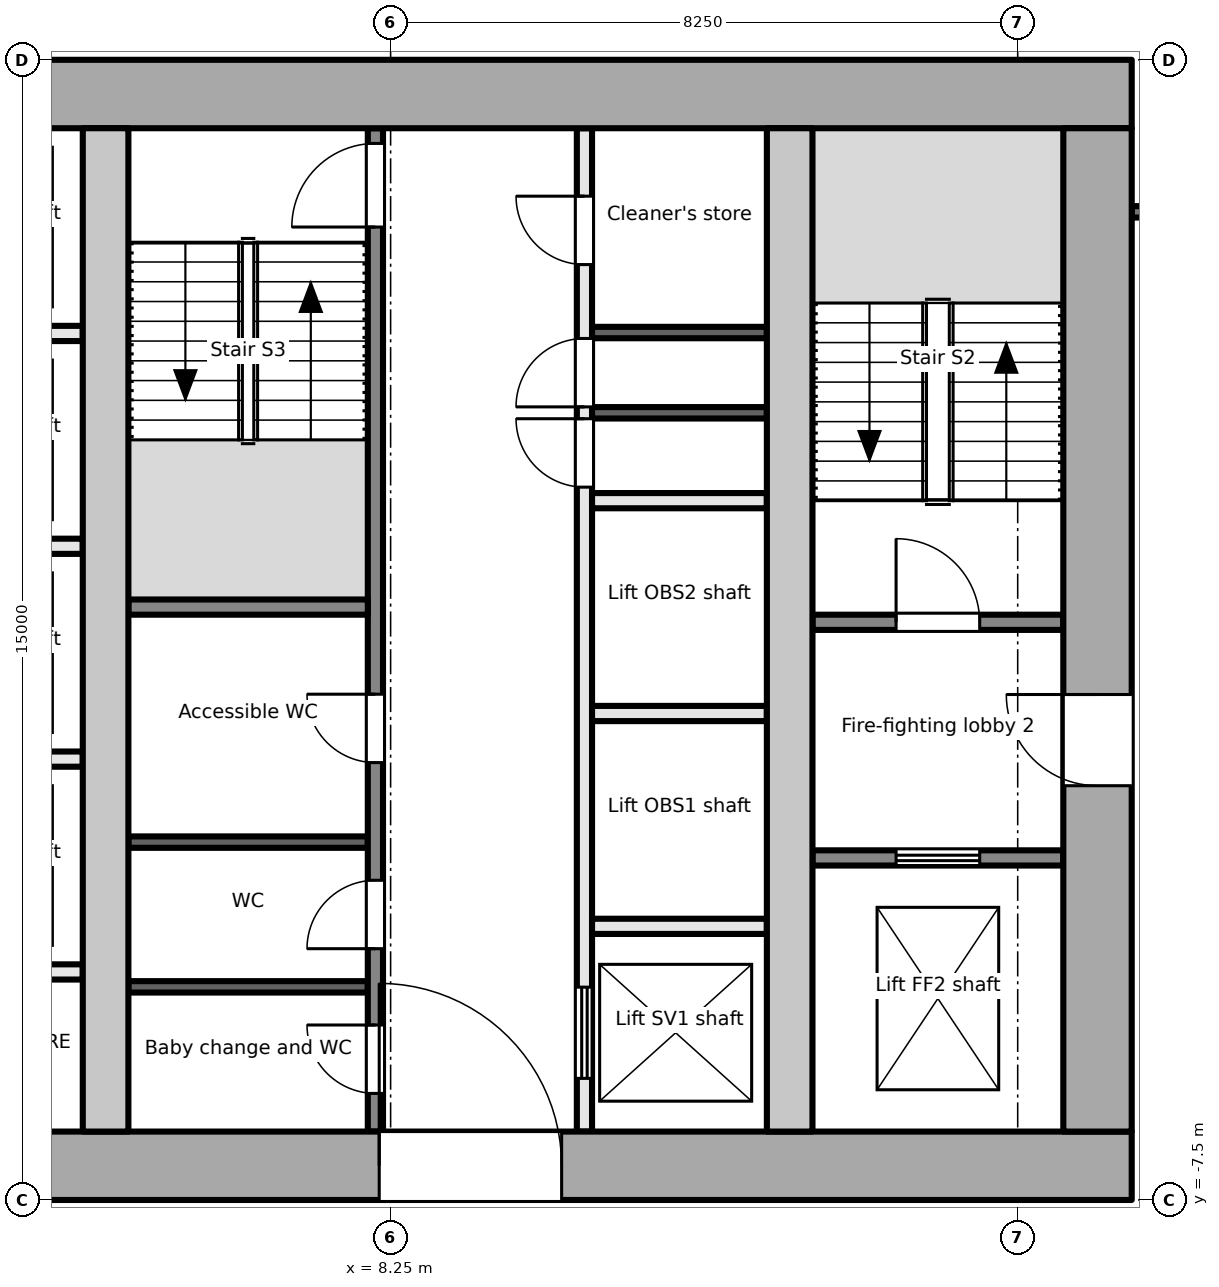
"""IFC4 building model, lengths in metres.
Left out: names, types, materials, properties, quantities, classifications, styles, units other than length and angle.
Written with IfcOpenShell. Run it as: python <this file> out.ifc"""

import sys

from ifc_helpers import new_model, si_unit, direction, frame, frame_2d, origin, place, context, subcontext, project, spatial, rectangle, extrude, element, fill, save


model = new_model("IFC4")
c1 = context("Model", 3, precision=1e-05, world=origin(), true_north=direction((0.0, 1.0)))
c2 = subcontext(c1, "Body", "Model", "MODEL_VIEW")
j1 = project(units=[si_unit("LENGTHUNIT", "METRE"), si_unit("PLANEANGLEUNIT", "RADIAN")], contexts=[c1])
p1 = place(None, origin())
s1 = spatial("IfcSite", under=j1, at=p1, CompositionType="ELEMENT")
p2 = place(p1, origin())
s2 = spatial("IfcBuilding", under=s1, at=p2, CompositionType="ELEMENT")
p3 = place(p2, frame((0.0, 0.0, 229.1)))
s3 = spatial("IfcBuildingStorey", under=s2, at=p3, CompositionType="ELEMENT", Elevation=229.1)
p4 = place(p3, frame((-18.0, -7.05, -0.2), z_axis=(0.0, 0.0, 1.0), x_axis=(1.0, 0.0, 0.0)))
e1 = element("IfcWall", 1, at=p4, inside=s3, PredefinedType="SHEAR", context=c2, shape_type="SweptSolid", body=[
    extrude(rectangle(XDim=36.0, YDim=0.9, at=frame_2d((18.0, 0.0))), origin(), (0.0, 0.0, 1.0), 3.9),
])
p5 = place(p4, frame((8.1, 0.0, 0.2)))
e2 = element("IfcOpeningElement", 2, at=p5, cuts=e1, PredefinedType="OPENING", context=c2, shape_type="SweptSolid", body=[
    extrude(rectangle(XDim=1.8, YDim=2.1, at=frame_2d((0.9, 1.05))), frame((0.0, 0.46, 0.0), z_axis=(0.0, -1.0, 0.0), x_axis=(1.0, 0.0, 0.0)), (0.0, 0.0, 1.0), 0.921),
])
p6 = place(p4, frame((16.8, 0.0, 0.2)))
e3 = element("IfcOpeningElement", 3, at=p6, cuts=e1, PredefinedType="OPENING", context=c2, shape_type="SweptSolid", body=[
    extrude(rectangle(XDim=2.4, YDim=2.1, at=frame_2d((1.2, 1.05))), frame((0.0, 0.46, 0.0), z_axis=(0.0, -1.0, 0.0), x_axis=(1.0, 0.0, 0.0)), (0.0, 0.0, 1.0), 0.921),
])
p7 = place(p4, frame((26.1, 0.0, 0.2)))
e4 = element("IfcOpeningElement", 4, at=p7, cuts=e1, PredefinedType="OPENING", context=c2, shape_type="SweptSolid", body=[
    extrude(rectangle(XDim=2.4, YDim=2.1, at=frame_2d((1.2, 1.05))), frame((0.0, 0.46, 0.0), z_axis=(0.0, -1.0, 0.0), x_axis=(1.0, 0.0, 0.0)), (0.0, 0.0, 1.0), 0.921),
])
p8 = place(p3, frame((-18.0, 7.05, -0.2), z_axis=(0.0, 0.0, 1.0), x_axis=(1.0, 0.0, 0.0)))
e5 = element("IfcWall", 5, at=p8, inside=s3, PredefinedType="SHEAR", context=c2, shape_type="SweptSolid", body=[
    extrude(rectangle(XDim=36.0, YDim=0.9, at=frame_2d((18.0, 0.0))), origin(), (0.0, 0.0, 1.0), 3.9),
])
p9 = place(p3, frame((17.55, -6.6, -0.2), z_axis=(0.0, 0.0, 1.0), x_axis=(0.0, 1.0, 0.0)))
e6 = element("IfcWall", 6, at=p9, inside=s3, PredefinedType="SHEAR", context=c2, shape_type="SweptSolid", body=[
    extrude(rectangle(XDim=13.2, YDim=0.9, at=frame_2d((6.6, 0.0))), origin(), (0.0, 0.0, 1.0), 3.9),
])
p10 = place(p9, frame((4.55, 0.0, 0.2)))
e7 = element("IfcOpeningElement", 7, at=p10, cuts=e6, PredefinedType="OPENING", context=c2, shape_type="SweptSolid", body=[
    extrude(rectangle(XDim=1.2, YDim=2.1, at=frame_2d((0.6, 1.05))), frame((0.0, 0.46, 0.0), z_axis=(0.0, -1.0, 0.0), x_axis=(1.0, 0.0, 0.0)), (0.0, 0.0, 1.0), 0.921),
])
for number, where, z_axis, x_axis in (
    (8, (4.5, -6.6, -0.2), (0.0, 0.0, 1.0), (0.0, 1.0, 0.0)),
    (9, (13.5, -6.6, -0.2), (0.0, 0.0, 1.0), (0.0, 1.0, 0.0)),
):
    element("IfcWall", number, at=place(p3, frame(where, z_axis=z_axis, x_axis=x_axis)), inside=s3, PredefinedType="SHEAR", context=c2, shape_type="SweptSolid", body=[
        extrude(rectangle(XDim=13.2, YDim=0.6, at=frame_2d((6.6, 0.0))), origin(), (0.0, 0.0, 1.0), 3.9),
    ])
p11 = place(p3, frame((13.8, -3.0, 0.0), z_axis=(0.0, 0.0, 1.0), x_axis=(1.0, 0.0, 0.0)))
e10 = element("IfcWall", 10, at=p11, inside=s3, PredefinedType="PARTITIONING", context=c2, shape_type="SweptSolid", body=[
    extrude(rectangle(XDim=3.3, YDim=0.2, at=frame_2d((1.65, 0.0))), origin(), (0.0, 0.0, 1.0), 3.7),
])
p12 = place(p11, frame((1.1, 0.0, 0.0)))
e11 = element("IfcOpeningElement", 11, at=p12, cuts=e10, PredefinedType="OPENING", context=c2, shape_type="SweptSolid", body=[
    extrude(rectangle(XDim=1.1, YDim=2.1, at=frame_2d((0.55, 1.05))), frame((0.0, 0.111, 0.0), z_axis=(0.0, -1.0, 0.0), x_axis=(1.0, 0.0, 0.0)), (0.0, 0.0, 1.0), 0.221),
])
p13 = place(p3, frame((13.8, 0.1, 0.0), z_axis=(0.0, 0.0, 1.0), x_axis=(1.0, 0.0, 0.0)))
e12 = element("IfcWall", 12, at=p13, inside=s3, PredefinedType="PARTITIONING", context=c2, shape_type="SweptSolid", body=[
    extrude(rectangle(XDim=3.3, YDim=0.2, at=frame_2d((1.65, 0.0))), origin(), (0.0, 0.0, 1.0), 3.7),
])
p14 = place(p13, frame((1.1, 0.0, 0.0)))
e13 = element("IfcOpeningElement", 13, at=p14, cuts=e12, PredefinedType="OPENING", context=c2, shape_type="SweptSolid", body=[
    extrude(rectangle(XDim=1.1, YDim=2.1, at=frame_2d((0.55, 1.05))), frame((0.0, 0.111, 0.0), z_axis=(0.0, -1.0, 0.0), x_axis=(1.0, 0.0, 0.0)), (0.0, 0.0, 1.0), 0.221),
])
for number, where, z_axis, x_axis in (
    (14, (1.9, -1.7, 0.0), (0.0, 0.0, 1.0), (1.0, 0.0, 0.0)),
    (15, (1.9, 1.1, 0.0), (0.0, 0.0, 1.0), (1.0, 0.0, 0.0)),
    (16, (1.9, 3.9, 0.0), (0.0, 0.0, 1.0), (1.0, 0.0, 0.0)),
    (17, (1.9, -4.5, 0.0), (0.0, 0.0, 1.0), (1.0, 0.0, 0.0)),
):
    element("IfcWall", number, at=place(p3, frame(where, z_axis=z_axis, x_axis=x_axis)), inside=s3, PredefinedType="PARTITIONING", context=c2, shape_type="SweptSolid", body=[
        extrude(rectangle(XDim=2.3, YDim=0.2, at=frame_2d((1.15, 0.0))), origin(), (0.0, 0.0, 1.0), 3.7),
    ])
p15 = place(p3, frame((8.05, -6.6, 0.0), z_axis=(0.0, 0.0, 1.0), x_axis=(0.0, 1.0, 0.0)))
e18 = element("IfcWall", 18, at=p15, inside=s3, PredefinedType="PARTITIONING", context=c2, shape_type="SweptSolid", body=[
    extrude(rectangle(XDim=13.2, YDim=0.2, at=frame_2d((6.6, 0.0))), origin(), (0.0, 0.0, 1.0), 3.7),
])
p16 = place(p15, frame((0.502, 0.0, 0.0)))
e19 = element("IfcOpeningElement", 19, at=p16, cuts=e18, PredefinedType="OPENING", context=c2, shape_type="SweptSolid", body=[
    extrude(rectangle(XDim=0.9, YDim=2.1, at=frame_2d((0.45, 1.05))), frame((0.0, 0.111, 0.0), z_axis=(0.0, -1.0, 0.0), x_axis=(1.0, 0.0, 0.0)), (0.0, 0.0, 1.0), 0.221),
])
p17 = place(p15, frame((2.406, 0.0, 0.0)))
e20 = element("IfcOpeningElement", 20, at=p17, cuts=e18, PredefinedType="OPENING", context=c2, shape_type="SweptSolid", body=[
    extrude(rectangle(XDim=0.9, YDim=2.1, at=frame_2d((0.45, 1.05))), frame((0.0, 0.111, 0.0), z_axis=(0.0, -1.0, 0.0), x_axis=(1.0, 0.0, 0.0)), (0.0, 0.0, 1.0), 0.221),
])
p18 = place(p15, frame((4.854, 0.0, 0.0)))
e21 = element("IfcOpeningElement", 21, at=p18, cuts=e18, PredefinedType="OPENING", context=c2, shape_type="SweptSolid", body=[
    extrude(rectangle(XDim=0.9, YDim=2.1, at=frame_2d((0.45, 1.05))), frame((0.0, 0.111, 0.0), z_axis=(0.0, -1.0, 0.0), x_axis=(1.0, 0.0, 0.0)), (0.0, 0.0, 1.0), 0.221),
])
p19 = place(p15, frame((11.9, 0.0, 0.0)))
e22 = element("IfcOpeningElement", 22, at=p19, cuts=e18, PredefinedType="OPENING", context=c2, shape_type="SweptSolid", body=[
    extrude(rectangle(XDim=1.1, YDim=2.1, at=frame_2d((0.55, 1.05))), frame((0.0, 0.111, 0.0), z_axis=(0.0, -1.0, 0.0), x_axis=(1.0, 0.0, 0.0)), (0.0, 0.0, 1.0), 0.221),
])
p20 = place(p3, frame((10.8, -6.6, 0.0), z_axis=(0.0, 0.0, 1.0), x_axis=(0.0, 1.0, 0.0)))
e23 = element("IfcWall", 23, at=p20, inside=s3, PredefinedType="PARTITIONING", context=c2, shape_type="SweptSolid", body=[
    extrude(rectangle(XDim=13.2, YDim=0.2, at=frame_2d((6.6, 0.0))), origin(), (0.0, 0.0, 1.0), 3.7),
])
p21 = place(p20, frame((0.7, 0.0, 0.0)))
e24 = element("IfcOpeningElement", 24, at=p21, cuts=e23, PredefinedType="OPENING", context=c2, shape_type="SweptSolid", body=[
    extrude(rectangle(XDim=1.2, YDim=2.1, at=frame_2d((0.6, 1.05))), frame((0.0, 0.111, 0.0), z_axis=(0.0, -1.0, 0.0), x_axis=(1.0, 0.0, 0.0)), (0.0, 0.0, 1.0), 0.221),
])
p22 = place(p20, frame((8.478, 0.0, 0.0)))
e25 = element("IfcOpeningElement", 25, at=p22, cuts=e23, PredefinedType="OPENING", context=c2, shape_type="SweptSolid", body=[
    extrude(rectangle(XDim=0.9, YDim=2.1, at=frame_2d((0.45, 1.05))), frame((0.0, 0.111, 0.0), z_axis=(0.0, -1.0, 0.0), x_axis=(1.0, 0.0, 0.0)), (0.0, 0.0, 1.0), 0.221),
])
p23 = place(p20, frame((9.534, 0.0, 0.0)))
e26 = element("IfcOpeningElement", 26, at=p23, cuts=e23, PredefinedType="OPENING", context=c2, shape_type="SweptSolid", body=[
    extrude(rectangle(XDim=0.9, YDim=2.1, at=frame_2d((0.45, 1.05))), frame((0.0, 0.111, 0.0), z_axis=(0.0, -1.0, 0.0), x_axis=(1.0, 0.0, 0.0)), (0.0, 0.0, 1.0), 0.221),
])
p24 = place(p20, frame((11.406, 0.0, 0.0)))
e27 = element("IfcOpeningElement", 27, at=p24, cuts=e23, PredefinedType="OPENING", context=c2, shape_type="SweptSolid", body=[
    extrude(rectangle(XDim=0.9, YDim=2.1, at=frame_2d((0.45, 1.05))), frame((0.0, 0.111, 0.0), z_axis=(0.0, -1.0, 0.0), x_axis=(1.0, 0.0, 0.0)), (0.0, 0.0, 1.0), 0.221),
])
p25 = place(p3, frame((4.8, 0.3, 0.0), z_axis=(0.0, 0.0, 1.0), x_axis=(1.0, 0.0, 0.0)))
e28 = element("IfcWall", 28, at=p25, inside=s3, PredefinedType="PARTITIONING", context=c2, shape_type="SweptSolid", body=[
    extrude(rectangle(XDim=3.15, YDim=0.2, at=frame_2d((1.575, 0.0))), origin(), (0.0, 0.0, 1.0), 3.7),
])
for number, where, z_axis, x_axis in (
    (29, (4.8, -4.696, 0.0), (0.0, 0.0, 1.0), (1.0, 0.0, 0.0)),
    (30, (4.8, -2.792, 0.0), (0.0, 0.0, 1.0), (1.0, 0.0, 0.0)),
):
    element("IfcWall", number, at=place(p3, frame(where, z_axis=z_axis, x_axis=x_axis)), inside=s3, PredefinedType="PARTITIONING", context=c2, shape_type="SweptSolid", body=[
        extrude(rectangle(XDim=3.15, YDim=0.15, at=frame_2d((1.575, 0.0))), origin(), (0.0, 0.0, 1.0), 3.7),
    ])
for number, where, z_axis, x_axis in (
    (31, (10.9, -3.9, 0.0), (0.0, 0.0, 1.0), (1.0, 0.0, 0.0)),
    (32, (10.9, -1.1, 0.0), (0.0, 0.0, 1.0), (1.0, 0.0, 0.0)),
    (33, (10.9, 1.7, 0.0), (0.0, 0.0, 1.0), (1.0, 0.0, 0.0)),
):
    element("IfcWall", number, at=place(p3, frame(where, z_axis=z_axis, x_axis=x_axis)), inside=s3, PredefinedType="PARTITIONING", context=c2, shape_type="SweptSolid", body=[
        extrude(rectangle(XDim=2.3, YDim=0.2, at=frame_2d((1.15, 0.0))), origin(), (0.0, 0.0, 1.0), 3.7),
    ])
for number, where, z_axis, x_axis in (
    (34, (10.9, 2.856, 0.0), (0.0, 0.0, 1.0), (1.0, 0.0, 0.0)),
    (35, (10.9, 3.912, 0.0), (0.0, 0.0, 1.0), (1.0, 0.0, 0.0)),
):
    element("IfcWall", number, at=place(p3, frame(where, z_axis=z_axis, x_axis=x_axis)), inside=s3, PredefinedType="PARTITIONING", context=c2, shape_type="SweptSolid", body=[
        extrude(rectangle(XDim=2.3, YDim=0.15, at=frame_2d((1.15, 0.0))), origin(), (0.0, 0.0, 1.0), 3.7),
    ])
p26 = place(p3, frame((18.0, 5.5, 0.0), z_axis=(0.0, 0.0, 1.0), x_axis=(1.0, 0.0, 0.0)))
e36 = element("IfcWall", 36, at=p26, inside=s3, PredefinedType="PARTITIONING", context=c2, shape_type="SweptSolid", body=[
    extrude(rectangle(XDim=2.7, YDim=0.15, at=frame_2d((1.35, 0.0))), origin(), (0.0, 0.0, 1.0), 3.7),
])
p27 = place(p26, frame((0.55, 0.0, 0.0)))
e37 = element("IfcOpeningElement", 37, at=p27, cuts=e36, PredefinedType="OPENING", context=c2, shape_type="SweptSolid", body=[
    extrude(rectangle(XDim=1.8, YDim=2.1, at=frame_2d((0.9, 1.05))), frame((0.0, 0.085, 0.0), z_axis=(0.0, -1.0, 0.0), x_axis=(1.0, 0.0, 0.0)), (0.0, 0.0, 1.0), 0.171),
])
p28 = place(p12, origin())
e38 = element("IfcDoor", 38, at=p28, inside=s3, OperationType="DOUBLE_DOOR_SLIDING", PredefinedType="DOOR", context=c2, shape_type="SweptSolid", body=[
    extrude(rectangle(XDim=1.1, YDim=2.1, at=frame_2d((0.55, 1.05))), frame((0.0, 0.025, 0.0), z_axis=(0.0, -1.0, 0.0), x_axis=(1.0, 0.0, 0.0)), (0.0, 0.0, 1.0), 0.05),
])
fill(e11, e38)
p29 = place(p10, origin())
e39 = element("IfcDoor", 39, at=p29, inside=s3, OperationType="SINGLE_SWING_RIGHT", PredefinedType="DOOR", context=c2, shape_type="SweptSolid", body=[
    extrude(rectangle(XDim=1.2, YDim=2.1, at=frame_2d((0.6, 1.05))), frame((0.0, 0.025, 0.0), z_axis=(0.0, -1.0, 0.0), x_axis=(1.0, 0.0, 0.0)), (0.0, 0.0, 1.0), 0.05),
])
fill(e7, e39)
p30 = place(p14, origin())
e40 = element("IfcDoor", 40, at=p30, inside=s3, OperationType="SINGLE_SWING_LEFT", PredefinedType="DOOR", context=c2, shape_type="SweptSolid", body=[
    extrude(rectangle(XDim=1.1, YDim=2.1, at=frame_2d((0.55, 1.05))), frame((0.0, 0.025, 0.0), z_axis=(0.0, -1.0, 0.0), x_axis=(1.0, 0.0, 0.0)), (0.0, 0.0, 1.0), 0.05),
])
fill(e13, e40)
p31 = place(p16, origin())
e41 = element("IfcDoor", 41, at=p31, inside=s3, OperationType="SINGLE_SWING_RIGHT", PredefinedType="DOOR", context=c2, shape_type="SweptSolid", body=[
    extrude(rectangle(XDim=0.9, YDim=2.1, at=frame_2d((0.45, 1.05))), frame((0.0, 0.025, 0.0), z_axis=(0.0, -1.0, 0.0), x_axis=(1.0, 0.0, 0.0)), (0.0, 0.0, 1.0), 0.05),
])
fill(e19, e41)
p32 = place(p17, origin())
e42 = element("IfcDoor", 42, at=p32, inside=s3, OperationType="SINGLE_SWING_LEFT", PredefinedType="DOOR", context=c2, shape_type="SweptSolid", body=[
    extrude(rectangle(XDim=0.9, YDim=2.1, at=frame_2d((0.45, 1.05))), frame((0.0, 0.025, 0.0), z_axis=(0.0, -1.0, 0.0), x_axis=(1.0, 0.0, 0.0)), (0.0, 0.0, 1.0), 0.05),
])
fill(e20, e42)
p33 = place(p18, origin())
e43 = element("IfcDoor", 43, at=p33, inside=s3, OperationType="SINGLE_SWING_RIGHT", PredefinedType="DOOR", context=c2, shape_type="SweptSolid", body=[
    extrude(rectangle(XDim=0.9, YDim=2.1, at=frame_2d((0.45, 1.05))), frame((0.0, 0.025, 0.0), z_axis=(0.0, -1.0, 0.0), x_axis=(1.0, 0.0, 0.0)), (0.0, 0.0, 1.0), 0.05),
])
fill(e21, e43)
p34 = place(p19, origin())
e44 = element("IfcDoor", 44, at=p34, inside=s3, OperationType="SINGLE_SWING_LEFT", PredefinedType="DOOR", context=c2, shape_type="SweptSolid", body=[
    extrude(rectangle(XDim=1.1, YDim=2.1, at=frame_2d((0.55, 1.05))), frame((0.0, 0.025, 0.0), z_axis=(0.0, -1.0, 0.0), x_axis=(1.0, 0.0, 0.0)), (0.0, 0.0, 1.0), 0.05),
])
fill(e22, e44)
p35 = place(p7, origin())
e45 = element("IfcDoor", 45, at=p35, inside=s3, OperationType="DOUBLE_DOOR_DOUBLE_SWING", PredefinedType="DOOR", context=c2, shape_type="SweptSolid", body=[
    extrude(rectangle(XDim=2.4, YDim=2.1, at=frame_2d((1.2, 1.05))), frame((0.0, 0.025, 0.0), z_axis=(0.0, -1.0, 0.0), x_axis=(1.0, 0.0, 0.0)), (0.0, 0.0, 1.0), 0.05),
])
fill(e4, e45)
p36 = place(p21, origin())
e46 = element("IfcDoor", 46, at=p36, inside=s3, OperationType="DOUBLE_DOOR_SLIDING", PredefinedType="DOOR", context=c2, shape_type="SweptSolid", body=[
    extrude(rectangle(XDim=1.2, YDim=2.1, at=frame_2d((0.6, 1.05))), frame((0.0, 0.025, 0.0), z_axis=(0.0, -1.0, 0.0), x_axis=(1.0, 0.0, 0.0)), (0.0, 0.0, 1.0), 0.05),
])
fill(e24, e46)
p37 = place(p22, origin())
e47 = element("IfcDoor", 47, at=p37, inside=s3, OperationType="SINGLE_SWING_RIGHT", PredefinedType="DOOR", context=c2, shape_type="SweptSolid", body=[
    extrude(rectangle(XDim=0.9, YDim=2.1, at=frame_2d((0.45, 1.05))), frame((0.0, 0.025, 0.0), z_axis=(0.0, -1.0, 0.0), x_axis=(1.0, 0.0, 0.0)), (0.0, 0.0, 1.0), 0.05),
])
fill(e25, e47)
p38 = place(p23, origin())
e48 = element("IfcDoor", 48, at=p38, inside=s3, OperationType="SINGLE_SWING_LEFT", PredefinedType="DOOR", context=c2, shape_type="SweptSolid", body=[
    extrude(rectangle(XDim=0.9, YDim=2.1, at=frame_2d((0.45, 1.05))), frame((0.0, 0.025, 0.0), z_axis=(0.0, -1.0, 0.0), x_axis=(1.0, 0.0, 0.0)), (0.0, 0.0, 1.0), 0.05),
])
fill(e26, e48)
p39 = place(p24, origin())
e49 = element("IfcDoor", 49, at=p39, inside=s3, OperationType="SINGLE_SWING_RIGHT", PredefinedType="DOOR", context=c2, shape_type="SweptSolid", body=[
    extrude(rectangle(XDim=0.9, YDim=2.1, at=frame_2d((0.45, 1.05))), frame((0.0, 0.025, 0.0), z_axis=(0.0, -1.0, 0.0), x_axis=(1.0, 0.0, 0.0)), (0.0, 0.0, 1.0), 0.05),
])
fill(e27, e49)
save(model, sys.argv[1])
